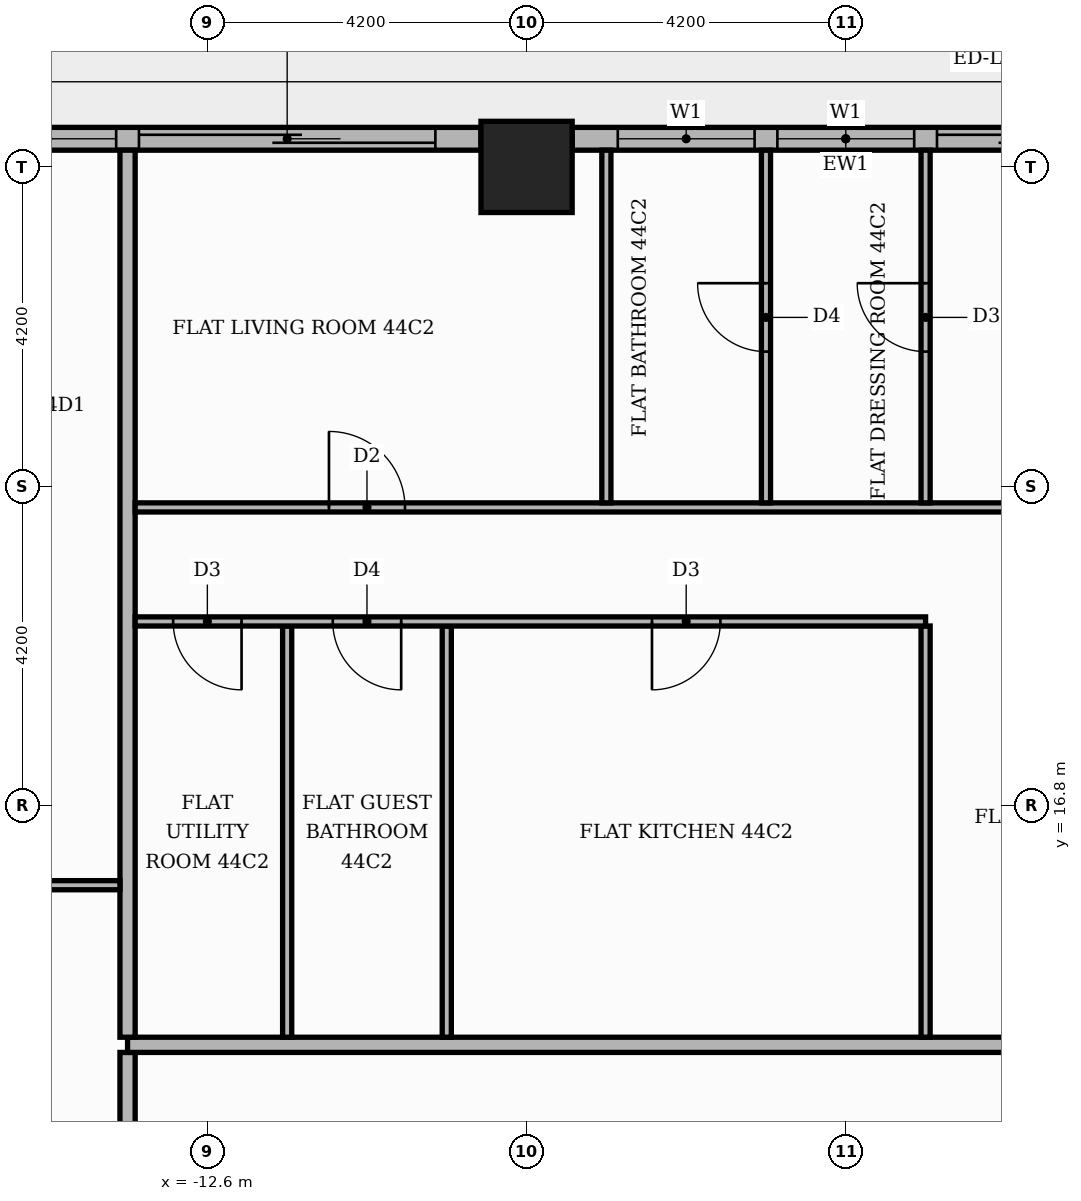
"""IFC4 building model, lengths in metres.
Left out: names, types, materials, properties, quantities, classifications, styles, units other than length and angle.
Written with IfcOpenShell. Run it as: python <this file> out.ifc"""

import sys

from ifc_helpers import new_model, si_unit, direction, frame, frame_2d, origin, origin_2d, place, context, subcontext, project, spatial, rectangle, extrude, element, fill, save


model = new_model("IFC4")
c1 = context("Model", 3, precision=1e-05, world=origin(), true_north=direction((0.0, 1.0)))
c2 = subcontext(c1, "Body", "Model", "MODEL_VIEW")
j1 = project(units=[si_unit("LENGTHUNIT", "METRE"), si_unit("PLANEANGLEUNIT", "RADIAN")], contexts=[c1])
p1 = place(None, origin())
s1 = spatial("IfcSite", under=j1, at=p1, CompositionType="ELEMENT")
p2 = place(p1, origin())
s2 = spatial("IfcBuilding", under=s1, at=p2, CompositionType="ELEMENT")
p3 = place(p2, frame((0.0, 0.0, 188.4)))
s3 = spatial("IfcBuildingStorey", under=s2, at=p3, CompositionType="ELEMENT", Elevation=188.4)
p4 = place(p3, frame((-8.4, 25.2, -0.42), z_axis=(0.0, 0.0, 1.0), x_axis=(1.0, 0.0, 0.0)))
e1 = element("IfcColumn", 1, at=p4, inside=s3, PredefinedType="COLUMN", context=c2, shape_type="SweptSolid", body=[
    extrude(rectangle(XDim=1.2, YDim=1.2, at=origin_2d()), origin(), (0.0, 0.0, 1.0), 4.32),
])
p5 = place(p3, frame((-0.6, 25.57, 0.0), z_axis=(0.0, 0.0, 1.0), x_axis=(-1.0, 0.0, 0.0)))
e2 = element("IfcWall", 2, at=p5, inside=s3, PredefinedType="STANDARD", context=c2, shape_type="SweptSolid", body=[
    extrude(rectangle(XDim=7.2, YDim=0.3, at=frame_2d((3.6, 0.0))), origin(), (0.0, 0.0, 1.0), 3.48),
])
p6 = place(p5, frame((0.6, 0.0, 0.0)))
e3 = element("IfcOpeningElement", 3, at=p6, cuts=e2, PredefinedType="OPENING", context=c2, shape_type="SweptSolid", body=[
    extrude(rectangle(XDim=1.8, YDim=2.4, at=frame_2d((0.9, 1.2))), frame((0.0, 0.16, 0.0), z_axis=(0.0, -1.0, 0.0), x_axis=(1.0, 0.0, 0.0)), (0.0, 0.0, 1.0), 0.32),
])
p7 = place(p5, frame((2.7, 0.0, 0.9)))
e4 = element("IfcOpeningElement", 4, at=p7, cuts=e2, PredefinedType="OPENING", context=c2, shape_type="SweptSolid", body=[
    extrude(rectangle(XDim=1.8, YDim=2.1, at=frame_2d((0.9, 1.05))), frame((0.0, 0.16, 0.0), z_axis=(0.0, -1.0, 0.0), x_axis=(1.0, 0.0, 0.0)), (0.0, 0.0, 1.0), 0.32),
])
p8 = place(p5, frame((4.8, 0.0, 0.9)))
e5 = element("IfcOpeningElement", 5, at=p8, cuts=e2, PredefinedType="OPENING", context=c2, shape_type="SweptSolid", body=[
    extrude(rectangle(XDim=1.8, YDim=2.1, at=frame_2d((0.9, 1.05))), frame((0.0, 0.16, 0.0), z_axis=(0.0, -1.0, 0.0), x_axis=(1.0, 0.0, 0.0)), (0.0, 0.0, 1.0), 0.32),
])
p9 = place(p3, frame((-9.0, 25.57, 0.0), z_axis=(0.0, 0.0, 1.0), x_axis=(-1.0, 0.0, 0.0)))
e6 = element("IfcWall", 6, at=p9, inside=s3, PredefinedType="STANDARD", context=c2, shape_type="SweptSolid", body=[
    extrude(rectangle(XDim=7.2, YDim=0.3, at=frame_2d((3.6, 0.0))), origin(), (0.0, 0.0, 1.0), 3.48),
])
p10 = place(p9, frame((0.6, 0.0, 0.0)))
e7 = element("IfcOpeningElement", 7, at=p10, cuts=e6, PredefinedType="OPENING", context=c2, shape_type="SweptSolid", body=[
    extrude(rectangle(XDim=3.9, YDim=2.4, at=frame_2d((1.95, 1.2))), frame((0.0, 0.16, 0.0), z_axis=(0.0, -1.0, 0.0), x_axis=(1.0, 0.0, 0.0)), (0.0, 0.0, 1.0), 0.32),
])
p11 = place(p9, frame((4.8, 0.0, 0.9)))
e8 = element("IfcOpeningElement", 8, at=p11, cuts=e6, PredefinedType="OPENING", context=c2, shape_type="SweptSolid", body=[
    extrude(rectangle(XDim=1.8, YDim=2.1, at=frame_2d((0.9, 1.05))), frame((0.0, 0.16, 0.0), z_axis=(0.0, -1.0, 0.0), x_axis=(1.0, 0.0, 0.0)), (0.0, 0.0, 1.0), 0.32),
])
p12 = place(p3, frame((-13.65, 5.35, 0.0), z_axis=(0.0, 0.0, 1.0), x_axis=(0.0, 1.0, 0.0)))
e9 = element("IfcWall", 9, at=p12, inside=s3, PredefinedType="PARTITIONING", context=c2, shape_type="SweptSolid", body=[
    extrude(rectangle(XDim=8.2, YDim=0.2, at=frame_2d((4.1, 0.0))), origin(), (0.0, 0.0, 1.0), 3.48),
])
p13 = place(p12, frame((5.65, 0.0, 0.0)))
e10 = element("IfcOpeningElement", 10, at=p13, cuts=e9, PredefinedType="OPENING", context=c2, shape_type="SweptSolid", body=[
    extrude(rectangle(XDim=1.1, YDim=2.4, at=frame_2d((0.55, 1.2))), frame((0.0, 0.11, 0.0), z_axis=(0.0, -1.0, 0.0), x_axis=(1.0, 0.0, 0.0)), (0.0, 0.0, 1.0), 0.22),
])
p14 = place(p3, frame((-13.65, 13.65, 0.0), z_axis=(0.0, 0.0, 1.0), x_axis=(1.0, 0.0, 0.0)))
e11 = element("IfcWall", 11, at=p14, inside=s3, PredefinedType="PARTITIONING", context=c2, shape_type="SweptSolid", body=[
    extrude(rectangle(XDim=39.07, YDim=0.2, at=frame_2d((19.535, 0.0))), origin(), (0.0, 0.0, 1.0), 3.48),
])
p15 = place(p14, frame((24.65, 0.0, 0.0)))
e12 = element("IfcOpeningElement", 12, at=p15, cuts=e11, PredefinedType="OPENING", context=c2, shape_type="SweptSolid", body=[
    extrude(rectangle(XDim=1.1, YDim=2.4, at=frame_2d((0.55, 1.2))), frame((0.0, 0.11, 0.0), z_axis=(0.0, -1.0, 0.0), x_axis=(1.0, 0.0, 0.0)), (0.0, 0.0, 1.0), 0.22),
])
p16 = place(p14, frame((12.05, 0.0, 0.0)))
e13 = element("IfcOpeningElement", 13, at=p16, cuts=e11, PredefinedType="OPENING", context=c2, shape_type="SweptSolid", body=[
    extrude(rectangle(XDim=1.1, YDim=2.4, at=frame_2d((0.55, 1.2))), frame((0.0, 0.11, 0.0), z_axis=(0.0, -1.0, 0.0), x_axis=(1.0, 0.0, 0.0)), (0.0, 0.0, 1.0), 0.22),
])
p17 = place(p3, frame((-13.65, 13.75, 0.0), z_axis=(0.0, 0.0, 1.0), x_axis=(0.0, 1.0, 0.0)))
e14 = element("IfcWall", 14, at=p17, inside=s3, PredefinedType="PARTITIONING", context=c2, shape_type="SweptSolid", body=[
    extrude(rectangle(XDim=11.67, YDim=0.2, at=frame_2d((5.835, 0.0))), origin(), (0.0, 0.0, 1.0), 3.48),
])
for number, where, z_axis, x_axis in (
    (15, (-11.55, 13.75, 0.0), (0.0, 0.0, 1.0), (0.0, 1.0, 0.0)),
    (16, (-9.45, 13.75, 0.0), (0.0, 0.0, 1.0), (0.0, 1.0, 0.0)),
    (17, (-3.15, 13.75, 0.0), (0.0, 0.0, 1.0), (0.0, 1.0, 0.0)),
):
    element("IfcWall", number, at=place(p3, frame(where, z_axis=z_axis, x_axis=x_axis)), inside=s3, PredefinedType="PARTITIONING", context=c2, shape_type="SweptSolid", body=[
        extrude(rectangle(XDim=5.41, YDim=0.12, at=frame_2d((2.705, 0.0))), origin(), (0.0, 0.0, 1.0), 3.48),
    ])
p18 = place(p3, frame((-20.42, 15.75, 0.0), z_axis=(0.0, 0.0, 1.0), x_axis=(1.0, 0.0, 0.0)))
e18 = element("IfcWall", 18, at=p18, inside=s3, PredefinedType="PARTITIONING", context=c2, shape_type="SweptSolid", body=[
    extrude(rectangle(XDim=6.67, YDim=0.12, at=frame_2d((3.335, 0.0))), origin(), (0.0, 0.0, 1.0), 3.48),
])
p19 = place(p18, frame((2.885, 0.0, 0.0)))
e19 = element("IfcOpeningElement", 19, at=p19, cuts=e18, PredefinedType="OPENING", context=c2, shape_type="SweptSolid", body=[
    extrude(rectangle(XDim=1.0, YDim=2.1, at=frame_2d((0.5, 1.05))), frame((0.0, 0.07, 0.0), z_axis=(0.0, -1.0, 0.0), x_axis=(1.0, 0.0, 0.0)), (0.0, 0.0, 1.0), 0.14),
])
p20 = place(p3, frame((-13.55, 19.22, 0.0), z_axis=(0.0, 0.0, 1.0), x_axis=(1.0, 0.0, 0.0)))
e20 = element("IfcWall", 20, at=p20, inside=s3, PredefinedType="PARTITIONING", context=c2, shape_type="SweptSolid", body=[
    extrude(rectangle(XDim=10.4, YDim=0.12, at=frame_2d((5.2, 0.0))), origin(), (0.0, 0.0, 1.0), 3.48),
])
p21 = place(p20, frame((6.8, 0.0, 0.0)))
e21 = element("IfcOpeningElement", 21, at=p21, cuts=e20, PredefinedType="OPENING", context=c2, shape_type="SweptSolid", body=[
    extrude(rectangle(XDim=0.9, YDim=2.1, at=frame_2d((0.45, 1.05))), frame((0.0, 0.07, 0.0), z_axis=(0.0, -1.0, 0.0), x_axis=(1.0, 0.0, 0.0)), (0.0, 0.0, 1.0), 0.14),
])
p22 = place(p20, frame((2.6, 0.0, 0.0)))
e22 = element("IfcOpeningElement", 22, at=p22, cuts=e20, PredefinedType="OPENING", context=c2, shape_type="SweptSolid", body=[
    extrude(rectangle(XDim=0.9, YDim=2.1, at=frame_2d((0.45, 1.05))), frame((0.0, 0.07, 0.0), z_axis=(0.0, -1.0, 0.0), x_axis=(1.0, 0.0, 0.0)), (0.0, 0.0, 1.0), 0.14),
])
p23 = place(p20, frame((0.5, 0.0, 0.0)))
e23 = element("IfcOpeningElement", 23, at=p23, cuts=e20, PredefinedType="OPENING", context=c2, shape_type="SweptSolid", body=[
    extrude(rectangle(XDim=0.9, YDim=2.1, at=frame_2d((0.45, 1.05))), frame((0.0, 0.07, 0.0), z_axis=(0.0, -1.0, 0.0), x_axis=(1.0, 0.0, 0.0)), (0.0, 0.0, 1.0), 0.14),
])
p24 = place(p3, frame((-13.55, 20.72, 0.0), z_axis=(0.0, 0.0, 1.0), x_axis=(1.0, 0.0, 0.0)))
e24 = element("IfcWall", 24, at=p24, inside=s3, PredefinedType="PARTITIONING", context=c2, shape_type="SweptSolid", body=[
    extrude(rectangle(XDim=18.7, YDim=0.12, at=frame_2d((9.35, 0.0))), origin(), (0.0, 0.0, 1.0), 3.48),
])
p25 = place(p24, frame((14.15, 0.0, 0.0)))
e25 = element("IfcOpeningElement", 25, at=p25, cuts=e24, PredefinedType="OPENING", context=c2, shape_type="SweptSolid", body=[
    extrude(rectangle(XDim=0.9, YDim=2.1, at=frame_2d((0.45, 1.05))), frame((0.0, 0.07, 0.0), z_axis=(0.0, -1.0, 0.0), x_axis=(1.0, 0.0, 0.0)), (0.0, 0.0, 1.0), 0.14),
])
p26 = place(p24, frame((2.55, 0.0, 0.0)))
e26 = element("IfcOpeningElement", 26, at=p26, cuts=e24, PredefinedType="OPENING", context=c2, shape_type="SweptSolid", body=[
    extrude(rectangle(XDim=1.0, YDim=2.1, at=frame_2d((0.5, 1.05))), frame((0.0, 0.07, 0.0), z_axis=(0.0, -1.0, 0.0), x_axis=(1.0, 0.0, 0.0)), (0.0, 0.0, 1.0), 0.14),
])
p27 = place(p3, frame((-7.35, 20.78, 0.0), z_axis=(0.0, 0.0, 1.0), x_axis=(0.0, 1.0, 0.0)))
e27 = element("IfcWall", 27, at=p27, inside=s3, PredefinedType="PARTITIONING", context=c2, shape_type="SweptSolid", body=[
    extrude(rectangle(XDim=4.64, YDim=0.12, at=frame_2d((2.32, 0.0))), origin(), (0.0, 0.0, 1.0), 3.48),
])
p28 = place(p3, frame((-5.25, 20.78, 0.0), z_axis=(0.0, 0.0, 1.0), x_axis=(0.0, 1.0, 0.0)))
e28 = element("IfcWall", 28, at=p28, inside=s3, PredefinedType="PARTITIONING", context=c2, shape_type="SweptSolid", body=[
    extrude(rectangle(XDim=4.64, YDim=0.12, at=frame_2d((2.32, 0.0))), origin(), (0.0, 0.0, 1.0), 3.48),
])
p29 = place(p28, frame((1.99, 0.0, 0.0)))
e29 = element("IfcOpeningElement", 29, at=p29, cuts=e28, PredefinedType="OPENING", context=c2, shape_type="SweptSolid", body=[
    extrude(rectangle(XDim=0.9, YDim=2.1, at=frame_2d((0.45, 1.05))), frame((0.0, 0.07, 0.0), z_axis=(0.0, -1.0, 0.0), x_axis=(1.0, 0.0, 0.0)), (0.0, 0.0, 1.0), 0.14),
])
p30 = place(p3, frame((-3.15, 20.78, 0.0), z_axis=(0.0, 0.0, 1.0), x_axis=(0.0, 1.0, 0.0)))
e30 = element("IfcWall", 30, at=p30, inside=s3, PredefinedType="PARTITIONING", context=c2, shape_type="SweptSolid", body=[
    extrude(rectangle(XDim=4.64, YDim=0.12, at=frame_2d((2.32, 0.0))), origin(), (0.0, 0.0, 1.0), 3.48),
])
p31 = place(p30, frame((1.99, 0.0, 0.0)))
e31 = element("IfcOpeningElement", 31, at=p31, cuts=e30, PredefinedType="OPENING", context=c2, shape_type="SweptSolid", body=[
    extrude(rectangle(XDim=0.9, YDim=2.1, at=frame_2d((0.45, 1.05))), frame((0.0, 0.07, 0.0), z_axis=(0.0, -1.0, 0.0), x_axis=(1.0, 0.0, 0.0)), (0.0, 0.0, 1.0), 0.14),
])
p32 = place(p6, origin())
e32 = element("IfcDoor", 32, at=p32, inside=s3, OperationType="SLIDING_TO_LEFT", PredefinedType="DOOR", context=c2, shape_type="SweptSolid", body=[
    extrude(rectangle(XDim=1.8, YDim=2.4, at=frame_2d((0.9, 1.2))), frame((0.0, 0.025, 0.0), z_axis=(0.0, -1.0, 0.0), x_axis=(1.0, 0.0, 0.0)), (0.0, 0.0, 1.0), 0.05),
])
fill(e3, e32)
p33 = place(p7, origin())
e33 = element("IfcWindow", 33, at=p33, inside=s3, PartitioningType="SINGLE_PANEL", PredefinedType="WINDOW", context=c2, shape_type="SweptSolid", body=[
    extrude(rectangle(XDim=1.8, YDim=2.1, at=frame_2d((0.9, 1.05))), frame((0.0, 0.03, 0.0), z_axis=(0.0, -1.0, 0.0), x_axis=(1.0, 0.0, 0.0)), (0.0, 0.0, 1.0), 0.06),
])
fill(e4, e33)
p34 = place(p8, origin())
e34 = element("IfcWindow", 34, at=p34, inside=s3, PartitioningType="SINGLE_PANEL", PredefinedType="WINDOW", context=c2, shape_type="SweptSolid", body=[
    extrude(rectangle(XDim=1.8, YDim=2.1, at=frame_2d((0.9, 1.05))), frame((0.0, 0.03, 0.0), z_axis=(0.0, -1.0, 0.0), x_axis=(1.0, 0.0, 0.0)), (0.0, 0.0, 1.0), 0.06),
])
fill(e5, e34)
p35 = place(p10, origin())
e35 = element("IfcDoor", 35, at=p35, inside=s3, OperationType="SLIDING_TO_LEFT", PredefinedType="DOOR", context=c2, shape_type="SweptSolid", body=[
    extrude(rectangle(XDim=3.9, YDim=2.4, at=frame_2d((1.95, 1.2))), frame((0.0, 0.025, 0.0), z_axis=(0.0, -1.0, 0.0), x_axis=(1.0, 0.0, 0.0)), (0.0, 0.0, 1.0), 0.05),
])
fill(e7, e35)
p36 = place(p11, origin())
e36 = element("IfcWindow", 36, at=p36, inside=s3, PartitioningType="SINGLE_PANEL", PredefinedType="WINDOW", context=c2, shape_type="SweptSolid", body=[
    extrude(rectangle(XDim=1.8, YDim=2.1, at=frame_2d((0.9, 1.05))), frame((0.0, 0.03, 0.0), z_axis=(0.0, -1.0, 0.0), x_axis=(1.0, 0.0, 0.0)), (0.0, 0.0, 1.0), 0.06),
])
fill(e8, e36)
p37 = place(p21, frame((0.9, 0.0, 0.0), z_axis=(0.0, 0.0, 1.0), x_axis=(-1.0, 0.0, 0.0)))
e37 = element("IfcDoor", 37, at=p37, inside=s3, OperationType="SINGLE_SWING_LEFT", PredefinedType="DOOR", context=c2, shape_type="SweptSolid", body=[
    extrude(rectangle(XDim=0.9, YDim=2.1, at=frame_2d((0.45, 1.05))), frame((0.0, 0.025, 0.0), z_axis=(0.0, -1.0, 0.0), x_axis=(1.0, 0.0, 0.0)), (0.0, 0.0, 1.0), 0.05),
])
fill(e21, e37)
p38 = place(p22, frame((0.9, 0.0, 0.0), z_axis=(0.0, 0.0, 1.0), x_axis=(-1.0, 0.0, 0.0)))
e38 = element("IfcDoor", 38, at=p38, inside=s3, OperationType="SINGLE_SWING_RIGHT", PredefinedType="DOOR", context=c2, shape_type="SweptSolid", body=[
    extrude(rectangle(XDim=0.9, YDim=2.1, at=frame_2d((0.45, 1.05))), frame((0.0, 0.025, 0.0), z_axis=(0.0, -1.0, 0.0), x_axis=(1.0, 0.0, 0.0)), (0.0, 0.0, 1.0), 0.05),
])
fill(e22, e38)
p39 = place(p23, frame((0.9, 0.0, 0.0), z_axis=(0.0, 0.0, 1.0), x_axis=(-1.0, 0.0, 0.0)))
e39 = element("IfcDoor", 39, at=p39, inside=s3, OperationType="SINGLE_SWING_RIGHT", PredefinedType="DOOR", context=c2, shape_type="SweptSolid", body=[
    extrude(rectangle(XDim=0.9, YDim=2.1, at=frame_2d((0.45, 1.05))), frame((0.0, 0.025, 0.0), z_axis=(0.0, -1.0, 0.0), x_axis=(1.0, 0.0, 0.0)), (0.0, 0.0, 1.0), 0.05),
])
fill(e23, e39)
p40 = place(p31, origin())
e40 = element("IfcDoor", 40, at=p40, inside=s3, OperationType="SINGLE_SWING_RIGHT", PredefinedType="DOOR", context=c2, shape_type="SweptSolid", body=[
    extrude(rectangle(XDim=0.9, YDim=2.1, at=frame_2d((0.45, 1.05))), frame((0.0, 0.025, 0.0), z_axis=(0.0, -1.0, 0.0), x_axis=(1.0, 0.0, 0.0)), (0.0, 0.0, 1.0), 0.05),
])
fill(e31, e40)
p41 = place(p29, origin())
e41 = element("IfcDoor", 41, at=p41, inside=s3, OperationType="SINGLE_SWING_RIGHT", PredefinedType="DOOR", context=c2, shape_type="SweptSolid", body=[
    extrude(rectangle(XDim=0.9, YDim=2.1, at=frame_2d((0.45, 1.05))), frame((0.0, 0.025, 0.0), z_axis=(0.0, -1.0, 0.0), x_axis=(1.0, 0.0, 0.0)), (0.0, 0.0, 1.0), 0.05),
])
fill(e29, e41)
p42 = place(p26, origin())
e42 = element("IfcDoor", 42, at=p42, inside=s3, OperationType="SINGLE_SWING_LEFT", PredefinedType="DOOR", context=c2, shape_type="SweptSolid", body=[
    extrude(rectangle(XDim=1.0, YDim=2.1, at=frame_2d((0.5, 1.05))), frame((0.0, 0.025, 0.0), z_axis=(0.0, -1.0, 0.0), x_axis=(1.0, 0.0, 0.0)), (0.0, 0.0, 1.0), 0.05),
])
fill(e26, e42)
save(model, sys.argv[1])
